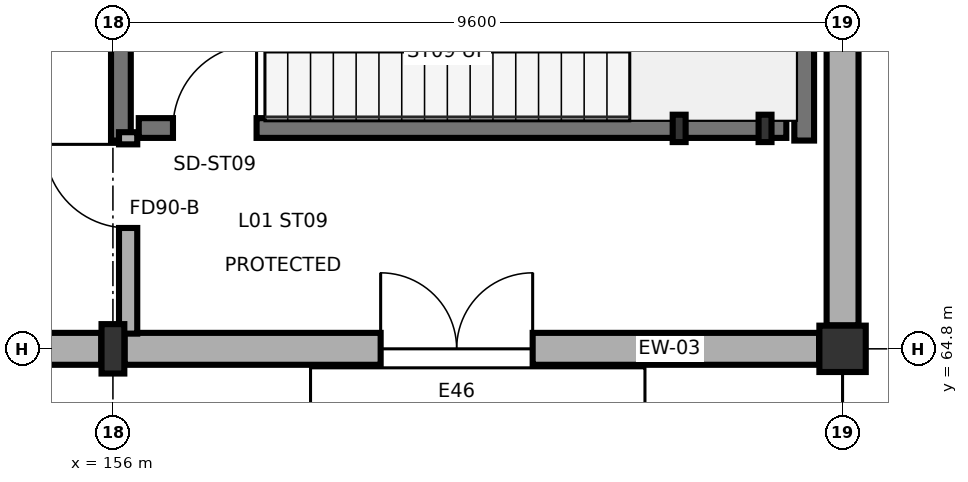
"""IFC4 building model, lengths in metres.
Left out: names, types, materials, properties, quantities, classifications, styles, units other than length and angle.
Written with IfcOpenShell. Run it as: python <this file> out.ifc"""

import sys

from ifc_helpers import new_model, si_unit, direction, frame, frame_2d, origin, origin_2d, place, context, subcontext, project, spatial, rectangle, hollow_circle, i_section, extrude, element, fill, save


model = new_model("IFC4")
c1 = context("Model", 3, precision=1e-05, world=origin(), true_north=direction((0.0, 1.0)))
c2 = subcontext(c1, "Body", "Model", "MODEL_VIEW")
j1 = project(units=[si_unit("LENGTHUNIT", "METRE"), si_unit("PLANEANGLEUNIT", "RADIAN")], contexts=[c1])
p1 = place(None, origin())
s1 = spatial("IfcSite", under=j1, at=p1, CompositionType="ELEMENT")
p2 = place(p1, origin())
s2 = spatial("IfcBuilding", under=s1, at=p2, CompositionType="ELEMENT")
p3 = place(p2, origin())
s3 = spatial("IfcBuildingStorey", under=s2, at=p3, CompositionType="ELEMENT", Elevation=0.0)
p4 = place(p3, frame((156.0, 64.8, 0.0), z_axis=(0.0, 0.0, 1.0), x_axis=(1.0, 0.0, 0.0)))
e1 = element("IfcColumn", 1, at=p4, inside=s3, PredefinedType="COLUMN", context=c2, shape_type="SweptSolid", body=[
    extrude(i_section(OverallWidth=0.3, OverallDepth=0.65, WebThickness=0.016, FlangeThickness=0.031, FilletRadius=0.027, at=origin_2d()), origin(), (0.0, 0.0, 1.0), 5.4),
])
p5 = place(p3, frame((165.6, 64.8, 0.0), z_axis=(0.0, 0.0, 1.0), x_axis=(1.0, 0.0, 0.0)))
e2 = element("IfcColumn", 2, at=p5, inside=s3, PredefinedType="COLUMN", context=c2, shape_type="SweptSolid", body=[
    extrude(hollow_circle(Radius=0.305, WallThickness=0.025, at=origin_2d()), origin(), (0.0, 0.0, 1.0), 5.4),
])
for number, where, z_axis, x_axis in (
    (3, (163.45, 67.7, 0.0), (0.0, 0.0, 1.0), (1.0, 0.0, 0.0)),
    (4, (164.58, 67.7, 0.0), (0.0, 0.0, 1.0), (1.0, 0.0, 0.0)),
):
    element("IfcColumn", number, at=place(p3, frame(where, z_axis=z_axis, x_axis=x_axis)), inside=s3, PredefinedType="PILASTER", context=c2, shape_type="SweptSolid", body=[
        extrude(i_section(OverallWidth=0.17, OverallDepth=0.36, WebThickness=0.008, FlangeThickness=0.013, FilletRadius=0.018, at=origin_2d()), origin(), (0.0, 0.0, 1.0), 5.4),
    ])
p6 = place(p3, frame((165.6, 65.109, 0.0), z_axis=(0.0, 0.0, 1.0), x_axis=(0.0, 1.0, 0.0)))
e5 = element("IfcWall", 5, at=p6, inside=s3, PredefinedType="SOLIDWALL", context=c2, shape_type="SweptSolid", body=[
    extrude(rectangle(XDim=8.962, YDim=0.42, at=frame_2d((4.481, 0.0))), origin(), (0.0, 0.0, 1.0), 4.625),
])
p7 = place(p3, frame((146.554, 64.8, 0.0), z_axis=(0.0, 0.0, 1.0), x_axis=(1.0, 0.0, 0.0)))
e6 = element("IfcWall", 6, at=p7, inside=s3, PredefinedType="SOLIDWALL", context=c2, shape_type="SweptSolid", body=[
    extrude(rectangle(XDim=9.292, YDim=0.42, at=frame_2d((4.646, 0.0))), origin(), (0.0, 0.0, 1.0), 4.685),
])
p8 = place(p7, frame((3.446, 0.0, 0.0)))
e7 = element("IfcOpeningElement", 7, at=p8, cuts=e6, PredefinedType="OPENING", context=c2, shape_type="SweptSolid", body=[
    extrude(rectangle(XDim=2.0, YDim=2.3, at=frame_2d((1.0, 1.15))), frame((0.0, 0.22, 0.0), z_axis=(0.0, -1.0, 0.0), x_axis=(1.0, 0.0, 0.0)), (0.0, 0.0, 1.0), 0.44),
])
p9 = place(p3, frame((156.154, 64.8, 0.0), z_axis=(0.0, 0.0, 1.0), x_axis=(1.0, 0.0, 0.0)))
e8 = element("IfcWall", 8, at=p9, inside=s3, PredefinedType="SOLIDWALL", context=c2, shape_type="SweptSolid", body=[
    extrude(rectangle(XDim=9.137, YDim=0.42, at=frame_2d((4.568, 0.0))), origin(), (0.0, 0.0, 1.0), 4.685),
])
p10 = place(p9, frame((3.368, 0.0, 0.0)))
e9 = element("IfcOpeningElement", 9, at=p10, cuts=e8, PredefinedType="OPENING", context=c2, shape_type="SweptSolid", body=[
    extrude(rectangle(XDim=2.0, YDim=2.3, at=frame_2d((1.0, 1.15))), frame((0.0, 0.22, 0.0), z_axis=(0.0, -1.0, 0.0), x_axis=(1.0, 0.0, 0.0)), (0.0, 0.0, 1.0), 0.44),
])
for number, where, z_axis, x_axis in (
    (10, (156.105, 67.54, 0.0), (0.0, 0.0, 1.0), (0.0, 1.0, 0.0)),
    (11, (165.095, 67.54, 0.0), (0.0, 0.0, 1.0), (0.0, 1.0, 0.0)),
):
    element("IfcWall", number, at=place(p3, frame(where, z_axis=z_axis, x_axis=x_axis)), inside=s3, PredefinedType="SHEAR", context=c2, shape_type="SweptSolid", body=[
        extrude(rectangle(XDim=4.27, YDim=0.26, at=frame_2d((2.135, 0.0))), origin(), (0.0, 0.0, 1.0), 5.14),
    ])
p11 = place(p3, frame((156.34, 67.705, 0.0), z_axis=(0.0, 0.0, 1.0), x_axis=(1.0, 0.0, 0.0)))
e12 = element("IfcWall", 12, at=p11, inside=s3, PredefinedType="SHEAR", context=c2, shape_type="SweptSolid", body=[
    extrude(rectangle(XDim=8.52, YDim=0.26, at=frame_2d((4.26, 0.0))), origin(), (0.0, 0.0, 1.0), 5.14),
])
p12 = place(p11, frame((0.45, 0.0, 0.0)))
e13 = element("IfcOpeningElement", 13, at=p12, cuts=e12, PredefinedType="OPENING", context=c2, shape_type="SweptSolid", body=[
    extrude(rectangle(XDim=1.1, YDim=2.2, at=frame_2d((0.55, 1.1))), frame((0.0, 0.14, 0.0), z_axis=(0.0, -1.0, 0.0), x_axis=(1.0, 0.0, 0.0)), (0.0, 0.0, 1.0), 0.28),
])
p13 = place(p3, frame((156.2, 65.0, 0.0), z_axis=(0.0, 0.0, 1.0), x_axis=(0.0, 1.0, 0.0)))
e14 = element("IfcWall", 14, at=p13, inside=s3, PredefinedType="SOLIDWALL", context=c2, shape_type="SweptSolid", body=[
    extrude(rectangle(XDim=2.65, YDim=0.24, at=frame_2d((1.325, 0.0))), origin(), (0.0, 0.0, 1.0), 5.14),
])
p14 = place(p13, frame((1.39, 0.0, 0.0)))
e15 = element("IfcOpeningElement", 15, at=p14, cuts=e14, PredefinedType="OPENING", context=c2, shape_type="SweptSolid", body=[
    extrude(rectangle(XDim=1.1, YDim=2.2, at=frame_2d((0.55, 1.1))), frame((0.0, 0.13, 0.0), z_axis=(0.0, -1.0, 0.0), x_axis=(1.0, 0.0, 0.0)), (0.0, 0.0, 1.0), 0.26),
])
p15 = place(p10, frame((2.0, 0.0, 0.0), z_axis=(0.0, 0.0, 1.0), x_axis=(-1.0, 0.0, 0.0)))
e16 = element("IfcDoor", 16, at=p15, inside=s3, OperationType="DOUBLE_DOOR_SINGLE_SWING", PredefinedType="DOOR", context=c2, shape_type="SweptSolid", body=[
    extrude(rectangle(XDim=2.0, YDim=2.3, at=frame_2d((1.0, 1.15))), frame((0.0, 0.025, 0.0), z_axis=(0.0, -1.0, 0.0), x_axis=(1.0, 0.0, 0.0)), (0.0, 0.0, 1.0), 0.05),
])
fill(e9, e16)
p16 = place(p12, origin())
e17 = element("IfcDoor", 17, at=p16, inside=s3, OperationType="SINGLE_SWING_RIGHT", PredefinedType="DOOR", context=c2, shape_type="SweptSolid", body=[
    extrude(rectangle(XDim=1.1, YDim=2.2, at=frame_2d((0.55, 1.1))), frame((0.0, 0.025, 0.0), z_axis=(0.0, -1.0, 0.0), x_axis=(1.0, 0.0, 0.0)), (0.0, 0.0, 1.0), 0.05),
])
fill(e13, e17)
p17 = place(p14, origin())
e18 = element("IfcDoor", 18, at=p17, inside=s3, OperationType="SINGLE_SWING_RIGHT", PredefinedType="DOOR", context=c2, shape_type="SweptSolid", body=[
    extrude(rectangle(XDim=1.1, YDim=2.2, at=frame_2d((0.55, 1.1))), frame((0.0, 0.025, 0.0), z_axis=(0.0, -1.0, 0.0), x_axis=(1.0, 0.0, 0.0)), (0.0, 0.0, 1.0), 0.05),
])
fill(e15, e18)
save(model, sys.argv[1])
